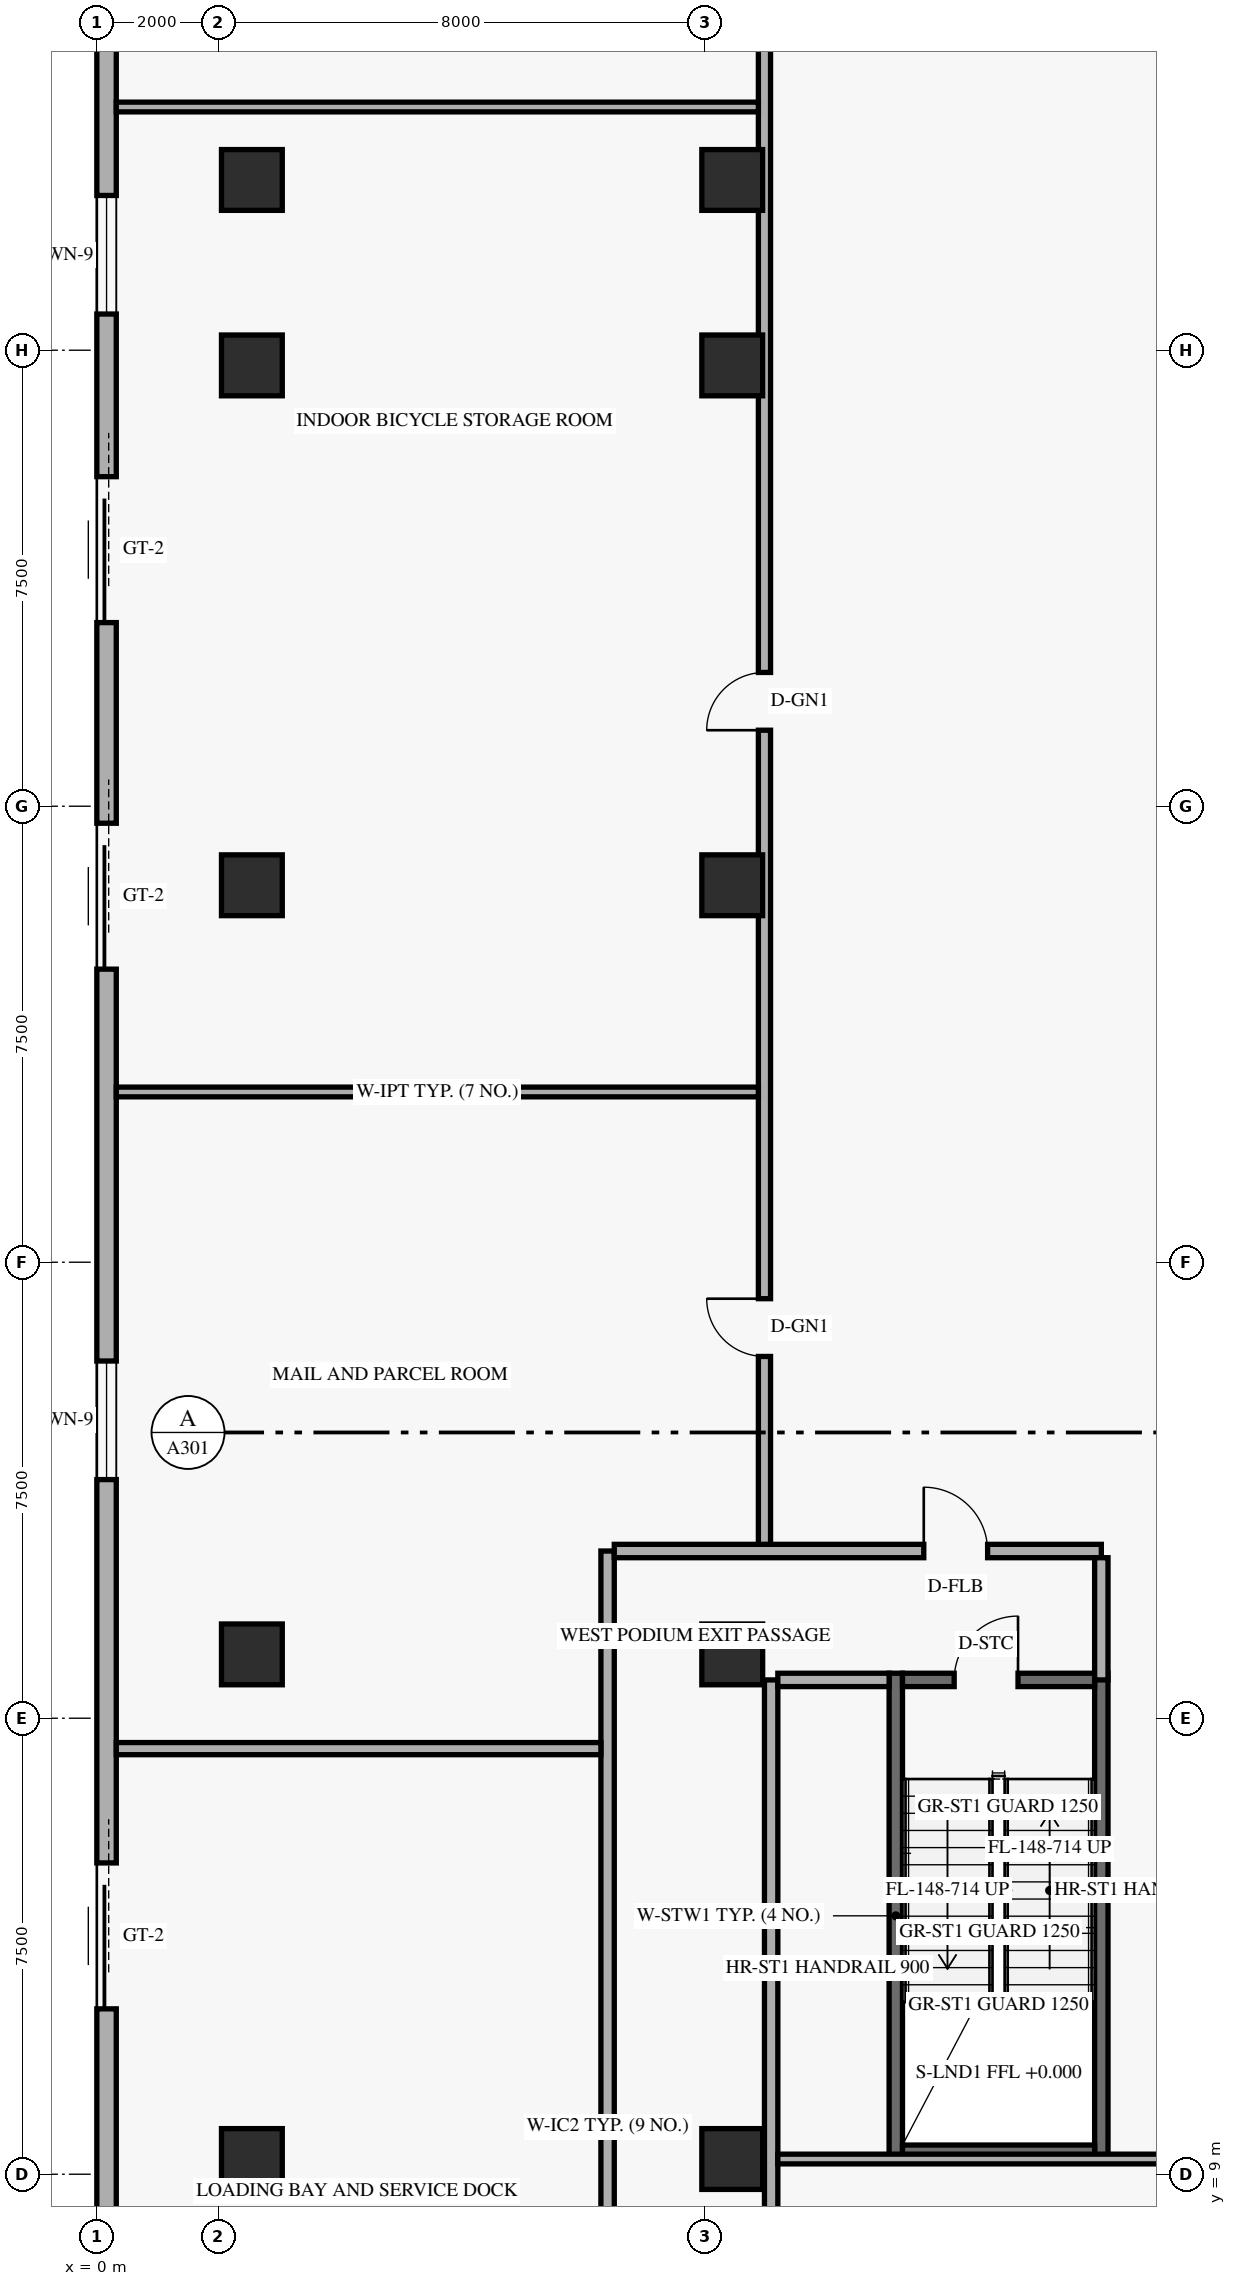
"""IFC4 building model, lengths in metres.
Left out: names, types, materials, properties, quantities, classifications, styles, units other than length and angle.
Written with IfcOpenShell. Run it as: python <this file> out.ifc"""

import sys

from ifc_helpers import new_model, si_unit, direction, frame, frame_2d, origin, origin_2d, place, context, subcontext, project, spatial, rectangle, extrude, element, fill, save


model = new_model("IFC4")
c1 = context("Model", 3, precision=1e-05, world=origin(), true_north=direction((0.0, 1.0)))
c2 = subcontext(c1, "Body", "Model", "MODEL_VIEW")
j1 = project(units=[si_unit("LENGTHUNIT", "METRE"), si_unit("PLANEANGLEUNIT", "RADIAN")], contexts=[c1])
p1 = place(None, origin())
s1 = spatial("IfcSite", under=j1, at=p1, CompositionType="ELEMENT")
p2 = place(p1, origin())
s2 = spatial("IfcBuilding", under=s1, at=p2, CompositionType="ELEMENT")
p3 = place(p2, origin())
s3 = spatial("IfcBuildingStorey", under=s2, at=p3, CompositionType="ELEMENT", Elevation=0.0)
for number, where, z_axis, x_axis in (
    (1, (13.14, 9.26, 0.0), (0.0, 0.0, 1.0), (0.0, 1.0, 0.0)),
    (2, (16.52, 9.26, 0.0), (0.0, 0.0, 1.0), (0.0, 1.0, 0.0)),
):
    element("IfcWall", number, at=place(p3, frame(where, z_axis=z_axis, x_axis=x_axis)), inside=s3, PredefinedType="SHEAR", context=c2, shape_type="SweptSolid", body=[
        extrude(rectangle(XDim=7.98, YDim=0.22, at=frame_2d((3.99, 0.0))), origin(), (0.0, 0.0, 1.0), 4.39),
    ])
p4 = place(p3, frame((13.25, 9.37, 0.0), z_axis=(0.0, 0.0, 1.0), x_axis=(1.0, 0.0, 0.0)))
e3 = element("IfcWall", 3, at=p4, inside=s3, PredefinedType="SHEAR", context=c2, shape_type="SweptSolid", body=[
    extrude(rectangle(XDim=3.16, YDim=0.22, at=frame_2d((1.58, 0.0))), origin(), (0.0, 0.0, 1.0), 4.39),
])
p5 = place(p3, frame((13.25, 17.13, 0.0), z_axis=(0.0, 0.0, 1.0), x_axis=(1.0, 0.0, 0.0)))
e4 = element("IfcWall", 4, at=p5, inside=s3, PredefinedType="SHEAR", context=c2, shape_type="SweptSolid", body=[
    extrude(rectangle(XDim=3.16, YDim=0.22, at=frame_2d((1.58, 0.0))), origin(), (0.0, 0.0, 1.0), 4.39),
])
p6 = place(p5, frame((0.85, 0.0, 0.0)))
e5 = element("IfcOpeningElement", 5, at=p6, cuts=e4, PredefinedType="OPENING", context=c2, shape_type="SweptSolid", body=[
    extrude(rectangle(XDim=1.05, YDim=2.15, at=frame_2d((0.525, 1.075))), frame((0.0, 0.12, 0.0), z_axis=(0.0, -1.0, 0.0), x_axis=(1.0, 0.0, 0.0)), (0.0, 0.0, 1.0), 0.24),
])
for number, where, z_axis, x_axis in (
    (6, (2.55, 9.25, 0.0), (0.0, 0.0, 1.0), (1.0, 0.0, 0.0)),
    (7, (2.55, 17.55, 0.0), (0.0, 0.0, 1.0), (1.0, 0.0, 0.0)),
    (8, (2.55, 30.2, 0.0), (0.0, 0.0, 1.0), (1.0, 0.0, 0.0)),
    (9, (2.55, 38.75, 0.0), (0.0, 0.0, 1.0), (1.0, 0.0, 0.0)),
    (10, (2.55, 41.8, 0.0), (0.0, 0.0, 1.0), (1.0, 0.0, 0.0)),
    (11, (10.45, 9.25, 0.0), (0.0, 0.0, 1.0), (1.0, 0.0, 0.0)),
    (12, (10.45, 17.55, 0.0), (0.0, 0.0, 1.0), (1.0, 0.0, 0.0)),
    (13, (10.45, 30.2, 0.0), (0.0, 0.0, 1.0), (1.0, 0.0, 0.0)),
    (14, (10.45, 38.75, 0.0), (0.0, 0.0, 1.0), (1.0, 0.0, 0.0)),
    (15, (10.45, 41.8, 0.0), (0.0, 0.0, 1.0), (1.0, 0.0, 0.0)),
):
    element("IfcColumn", number, at=place(p3, frame(where, z_axis=z_axis, x_axis=x_axis)), inside=s3, PredefinedType="COLUMN", context=c2, shape_type="SweptSolid", body=[
        extrude(rectangle(XDim=1.0, YDim=1.0, at=origin_2d()), origin(), (0.0, 0.0, 1.0), 4.8),
    ])
p7 = place(p3, frame((0.16, 0.32, 0.0), z_axis=(0.0, 0.0, 1.0), x_axis=(0.0, 1.0, 0.0)))
e16 = element("IfcWall", 16, at=p7, inside=s3, PredefinedType="SOLIDWALL", context=c2, shape_type="SweptSolid", body=[
    extrude(rectangle(XDim=55.16, YDim=0.32, at=frame_2d((27.58, 0.0))), origin(), (0.0, 0.0, 1.0), 4.39),
])
p8 = place(p7, frame((1.5, 0.0, 0.0)))
e17 = element("IfcOpeningElement", 17, at=p8, cuts=e16, PredefinedType="OPENING", context=c2, shape_type="SweptSolid", body=[
    extrude(rectangle(XDim=3.6, YDim=3.5, at=frame_2d((1.8, 1.75))), frame((0.0, 0.17, 0.0), z_axis=(0.0, -1.0, 0.0), x_axis=(1.0, 0.0, 0.0)), (0.0, 0.0, 1.0), 0.34),
])
p9 = place(p7, frame((11.4, 0.0, 0.0)))
e18 = element("IfcOpeningElement", 18, at=p9, cuts=e16, PredefinedType="OPENING", context=c2, shape_type="SweptSolid", body=[
    extrude(rectangle(XDim=2.4, YDim=2.55, at=frame_2d((1.2, 1.275))), frame((0.0, 0.17, 0.0), z_axis=(0.0, -1.0, 0.0), x_axis=(1.0, 0.0, 0.0)), (0.0, 0.0, 1.0), 0.34),
])
p10 = place(p7, frame((28.5, 0.0, 0.0)))
e19 = element("IfcOpeningElement", 19, at=p10, cuts=e16, PredefinedType="OPENING", context=c2, shape_type="SweptSolid", body=[
    extrude(rectangle(XDim=2.4, YDim=2.55, at=frame_2d((1.2, 1.275))), frame((0.0, 0.17, 0.0), z_axis=(0.0, -1.0, 0.0), x_axis=(1.0, 0.0, 0.0)), (0.0, 0.0, 1.0), 0.34),
])
p11 = place(p7, frame((34.2, 0.0, 0.0)))
e20 = element("IfcOpeningElement", 20, at=p11, cuts=e16, PredefinedType="OPENING", context=c2, shape_type="SweptSolid", body=[
    extrude(rectangle(XDim=2.4, YDim=2.55, at=frame_2d((1.2, 1.275))), frame((0.0, 0.17, 0.0), z_axis=(0.0, -1.0, 0.0), x_axis=(1.0, 0.0, 0.0)), (0.0, 0.0, 1.0), 0.34),
])
p12 = place(p7, frame((20.105, 0.0, 0.85)))
e21 = element("IfcOpeningElement", 21, at=p12, cuts=e16, PredefinedType="OPENING", context=c2, shape_type="SweptSolid", body=[
    extrude(rectangle(XDim=1.95, YDim=1.75, at=frame_2d((0.975, 0.875))), frame((0.0, 0.17, 0.0), z_axis=(0.0, -1.0, 0.0), x_axis=(1.0, 0.0, 0.0)), (0.0, 0.0, 1.0), 0.34),
])
p13 = place(p7, frame((39.275, 0.0, 0.85)))
e22 = element("IfcOpeningElement", 22, at=p13, cuts=e16, PredefinedType="OPENING", context=c2, shape_type="SweptSolid", body=[
    extrude(rectangle(XDim=1.95, YDim=1.75, at=frame_2d((0.975, 0.875))), frame((0.0, 0.17, 0.0), z_axis=(0.0, -1.0, 0.0), x_axis=(1.0, 0.0, 0.0)), (0.0, 0.0, 1.0), 0.34),
])
p14 = place(p7, frame((47.945, 0.0, 0.85)))
e23 = element("IfcOpeningElement", 23, at=p14, cuts=e16, PredefinedType="OPENING", context=c2, shape_type="SweptSolid", body=[
    extrude(rectangle(XDim=1.95, YDim=1.75, at=frame_2d((0.975, 0.875))), frame((0.0, 0.17, 0.0), z_axis=(0.0, -1.0, 0.0), x_axis=(1.0, 0.0, 0.0)), (0.0, 0.0, 1.0), 0.34),
])
p15 = place(p3, frame((8.4, 0.32, 0.0), z_axis=(0.0, 0.0, 1.0), x_axis=(0.0, 1.0, 0.0)))
e24 = element("IfcWall", 24, at=p15, inside=s3, PredefinedType="STANDARD", context=c2, shape_type="SweptSolid", body=[
    extrude(rectangle(XDim=18.93, YDim=0.22, at=frame_2d((9.465, 0.0))), origin(), (0.0, 0.0, 1.0), 3.272),
])
p16 = place(p15, frame((4.4, 0.0, 0.0)))
e25 = element("IfcOpeningElement", 25, at=p16, cuts=e24, PredefinedType="OPENING", context=c2, shape_type="SweptSolid", body=[
    extrude(rectangle(XDim=1.0, YDim=2.15, at=frame_2d((0.5, 1.075))), frame((0.0, 0.12, 0.0), z_axis=(0.0, -1.0, 0.0), x_axis=(1.0, 0.0, 0.0)), (0.0, 0.0, 1.0), 0.24),
])
p17 = place(p3, frame((11.09, 0.32, 0.0), z_axis=(0.0, 0.0, 1.0), x_axis=(0.0, 1.0, 0.0)))
e26 = element("IfcWall", 26, at=p17, inside=s3, PredefinedType="STANDARD", context=c2, shape_type="SweptSolid", body=[
    extrude(rectangle(XDim=16.81, YDim=0.22, at=frame_2d((8.405, 0.0))), origin(), (0.0, 0.0, 1.0), 3.761),
])
p18 = place(p3, frame((11.2, 17.13, 0.0), z_axis=(0.0, 0.0, 1.0), x_axis=(1.0, 0.0, 0.0)))
e27 = element("IfcWall", 27, at=p18, inside=s3, PredefinedType="STANDARD", context=c2, shape_type="SweptSolid", body=[
    extrude(rectangle(XDim=1.83, YDim=0.22, at=frame_2d((0.915, 0.0))), origin(), (0.0, 0.0, 1.0), 4.39),
])
p19 = place(p3, frame((8.51, 19.25, 0.0), z_axis=(0.0, 0.0, 1.0), x_axis=(1.0, 0.0, 0.0)))
e28 = element("IfcWall", 28, at=p19, inside=s3, PredefinedType="STANDARD", context=c2, shape_type="SweptSolid", body=[
    extrude(rectangle(XDim=8.01, YDim=0.22, at=frame_2d((4.005, 0.0))), origin(), (0.0, 0.0, 1.0), 3.521),
])
p20 = place(p19, frame((5.09, 0.0, 0.0)))
e29 = element("IfcOpeningElement", 29, at=p20, cuts=e28, PredefinedType="OPENING", context=c2, shape_type="SweptSolid", body=[
    extrude(rectangle(XDim=1.05, YDim=2.15, at=frame_2d((0.525, 1.075))), frame((0.0, 0.12, 0.0), z_axis=(0.0, -1.0, 0.0), x_axis=(1.0, 0.0, 0.0)), (0.0, 0.0, 1.0), 0.24),
])
p21 = place(p3, frame((16.52, 17.13, 0.0), z_axis=(0.0, 0.0, 1.0), x_axis=(0.0, 1.0, 0.0)))
e30 = element("IfcWall", 30, at=p21, inside=s3, PredefinedType="STANDARD", context=c2, shape_type="SweptSolid", body=[
    extrude(rectangle(XDim=2.01, YDim=0.22, at=frame_2d((1.005, 0.0))), origin(), (0.0, 0.0, 1.0), 3.272),
])
p22 = place(p3, frame((10.98, 19.36, 0.0), z_axis=(0.0, 0.0, 1.0), x_axis=(0.0, 1.0, 0.0)))
e31 = element("IfcWall", 31, at=p22, inside=s3, PredefinedType="STANDARD", context=c2, shape_type="SweptSolid", body=[
    extrude(rectangle(XDim=36.12, YDim=0.2, at=frame_2d((18.06, 0.0))), origin(), (0.0, 0.0, 1.0), 3.272),
])
p23 = place(p22, frame((3.09, 0.0, 0.0)))
e32 = element("IfcOpeningElement", 32, at=p23, cuts=e31, PredefinedType="OPENING", context=c2, shape_type="SweptSolid", body=[
    extrude(rectangle(XDim=0.95, YDim=2.15, at=frame_2d((0.475, 1.075))), frame((0.0, 0.11, 0.0), z_axis=(0.0, -1.0, 0.0), x_axis=(1.0, 0.0, 0.0)), (0.0, 0.0, 1.0), 0.22),
])
p24 = place(p22, frame((13.39, 0.0, 0.0)))
e33 = element("IfcOpeningElement", 33, at=p24, cuts=e31, PredefinedType="OPENING", context=c2, shape_type="SweptSolid", body=[
    extrude(rectangle(XDim=0.95, YDim=2.15, at=frame_2d((0.475, 1.075))), frame((0.0, 0.11, 0.0), z_axis=(0.0, -1.0, 0.0), x_axis=(1.0, 0.0, 0.0)), (0.0, 0.0, 1.0), 0.22),
])
p25 = place(p22, frame((27.39, 0.0, 0.0)))
e34 = element("IfcOpeningElement", 34, at=p25, cuts=e31, PredefinedType="OPENING", context=c2, shape_type="SweptSolid", body=[
    extrude(rectangle(XDim=0.95, YDim=2.15, at=frame_2d((0.475, 1.075))), frame((0.0, 0.11, 0.0), z_axis=(0.0, -1.0, 0.0), x_axis=(1.0, 0.0, 0.0)), (0.0, 0.0, 1.0), 0.22),
])
p26 = place(p3, frame((0.32, 16.0, 0.0), z_axis=(0.0, 0.0, 1.0), x_axis=(1.0, 0.0, 0.0)))
e35 = element("IfcWall", 35, at=p26, inside=s3, PredefinedType="STANDARD", context=c2, shape_type="SweptSolid", body=[
    extrude(rectangle(XDim=7.97, YDim=0.2, at=frame_2d((3.985, 0.0))), origin(), (0.0, 0.0, 1.0), 3.761),
])
for number, where, z_axis, x_axis in (
    (36, (0.32, 26.8, 0.0), (0.0, 0.0, 1.0), (1.0, 0.0, 0.0)),
    (37, (0.32, 43.0, 0.0), (0.0, 0.0, 1.0), (1.0, 0.0, 0.0)),
):
    element("IfcWall", number, at=place(p3, frame(where, z_axis=z_axis, x_axis=x_axis)), inside=s3, PredefinedType="PARTITIONING", context=c2, shape_type="SweptSolid", body=[
        extrude(rectangle(XDim=10.56, YDim=0.16, at=frame_2d((5.28, 0.0))), origin(), (0.0, 0.0, 1.0), 3.521),
    ])
p27 = place(p3, frame((11.2, 9.25, 0.0), z_axis=(0.0, 0.0, 1.0), x_axis=(1.0, 0.0, 0.0)))
e38 = element("IfcWall", 38, at=p27, inside=s3, PredefinedType="PARTITIONING", context=c2, shape_type="SweptSolid", body=[
    extrude(rectangle(XDim=12.8, YDim=0.16, at=frame_2d((6.4, 0.0))), origin(), (0.0, 0.0, 1.0), 3.272),
])
p28 = place(p27, frame((7.77, 0.0, 0.0)))
e39 = element("IfcOpeningElement", 39, at=p28, cuts=e38, PredefinedType="OPENING", context=c2, shape_type="SweptSolid", body=[
    extrude(rectangle(XDim=1.15, YDim=2.15, at=frame_2d((0.575, 1.075))), frame((0.0, 0.09, 0.0), z_axis=(0.0, -1.0, 0.0), x_axis=(1.0, 0.0, 0.0)), (0.0, 0.0, 1.0), 0.18),
])
p29 = place(p9, origin())
e40 = element("IfcDoor", 40, at=p29, inside=s3, OperationType="SLIDING_TO_RIGHT", PredefinedType="GATE", context=c2, shape_type="SweptSolid", body=[
    extrude(rectangle(XDim=2.4, YDim=2.55, at=frame_2d((1.2, 1.275))), frame((0.0, 0.025, 0.0), z_axis=(0.0, -1.0, 0.0), x_axis=(1.0, 0.0, 0.0)), (0.0, 0.0, 1.0), 0.05),
])
fill(e18, e40)
p30 = place(p10, origin())
e41 = element("IfcDoor", 41, at=p30, inside=s3, OperationType="SLIDING_TO_LEFT", PredefinedType="GATE", context=c2, shape_type="SweptSolid", body=[
    extrude(rectangle(XDim=2.4, YDim=2.55, at=frame_2d((1.2, 1.275))), frame((0.0, 0.025, 0.0), z_axis=(0.0, -1.0, 0.0), x_axis=(1.0, 0.0, 0.0)), (0.0, 0.0, 1.0), 0.05),
])
fill(e19, e41)
p31 = place(p11, origin())
e42 = element("IfcDoor", 42, at=p31, inside=s3, OperationType="SLIDING_TO_RIGHT", PredefinedType="GATE", context=c2, shape_type="SweptSolid", body=[
    extrude(rectangle(XDim=2.4, YDim=2.55, at=frame_2d((1.2, 1.275))), frame((0.0, 0.025, 0.0), z_axis=(0.0, -1.0, 0.0), x_axis=(1.0, 0.0, 0.0)), (0.0, 0.0, 1.0), 0.05),
])
fill(e20, e42)
p32 = place(p12, origin())
e43 = element("IfcWindow", 43, at=p32, inside=s3, PartitioningType="SINGLE_PANEL", PredefinedType="WINDOW", context=c2, shape_type="SweptSolid", body=[
    extrude(rectangle(XDim=1.95, YDim=1.75, at=frame_2d((0.975, 0.875))), frame((0.0, 0.03, 0.0), z_axis=(0.0, -1.0, 0.0), x_axis=(1.0, 0.0, 0.0)), (0.0, 0.0, 1.0), 0.06),
])
fill(e21, e43)
p33 = place(p13, origin())
e44 = element("IfcWindow", 44, at=p33, inside=s3, PartitioningType="SINGLE_PANEL", PredefinedType="WINDOW", context=c2, shape_type="SweptSolid", body=[
    extrude(rectangle(XDim=1.95, YDim=1.75, at=frame_2d((0.975, 0.875))), frame((0.0, 0.03, 0.0), z_axis=(0.0, -1.0, 0.0), x_axis=(1.0, 0.0, 0.0)), (0.0, 0.0, 1.0), 0.06),
])
fill(e22, e44)
p34 = place(p6, frame((1.05, 0.0, 0.0), z_axis=(0.0, 0.0, 1.0), x_axis=(-1.0, 0.0, 0.0)))
e45 = element("IfcDoor", 45, at=p34, inside=s3, OperationType="SINGLE_SWING_LEFT", PredefinedType="DOOR", context=c2, shape_type="SweptSolid", body=[
    extrude(rectangle(XDim=1.05, YDim=2.15, at=frame_2d((0.525, 1.075))), frame((0.0, 0.025, 0.0), z_axis=(0.0, -1.0, 0.0), x_axis=(1.0, 0.0, 0.0)), (0.0, 0.0, 1.0), 0.05),
])
fill(e5, e45)
p35 = place(p20, origin())
e46 = element("IfcDoor", 46, at=p35, inside=s3, OperationType="SINGLE_SWING_LEFT", PredefinedType="DOOR", context=c2, shape_type="SweptSolid", body=[
    extrude(rectangle(XDim=1.05, YDim=2.15, at=frame_2d((0.525, 1.075))), frame((0.0, 0.025, 0.0), z_axis=(0.0, -1.0, 0.0), x_axis=(1.0, 0.0, 0.0)), (0.0, 0.0, 1.0), 0.05),
])
fill(e29, e46)
p36 = place(p23, origin())
e47 = element("IfcDoor", 47, at=p36, inside=s3, OperationType="SINGLE_SWING_RIGHT", PredefinedType="DOOR", context=c2, shape_type="SweptSolid", body=[
    extrude(rectangle(XDim=0.95, YDim=2.15, at=frame_2d((0.475, 1.075))), frame((0.0, 0.025, 0.0), z_axis=(0.0, -1.0, 0.0), x_axis=(1.0, 0.0, 0.0)), (0.0, 0.0, 1.0), 0.05),
])
fill(e32, e47)
p37 = place(p24, origin())
e48 = element("IfcDoor", 48, at=p37, inside=s3, OperationType="SINGLE_SWING_LEFT", PredefinedType="DOOR", context=c2, shape_type="SweptSolid", body=[
    extrude(rectangle(XDim=0.95, YDim=2.15, at=frame_2d((0.475, 1.075))), frame((0.0, 0.025, 0.0), z_axis=(0.0, -1.0, 0.0), x_axis=(1.0, 0.0, 0.0)), (0.0, 0.0, 1.0), 0.05),
])
fill(e33, e48)
save(model, sys.argv[1])
